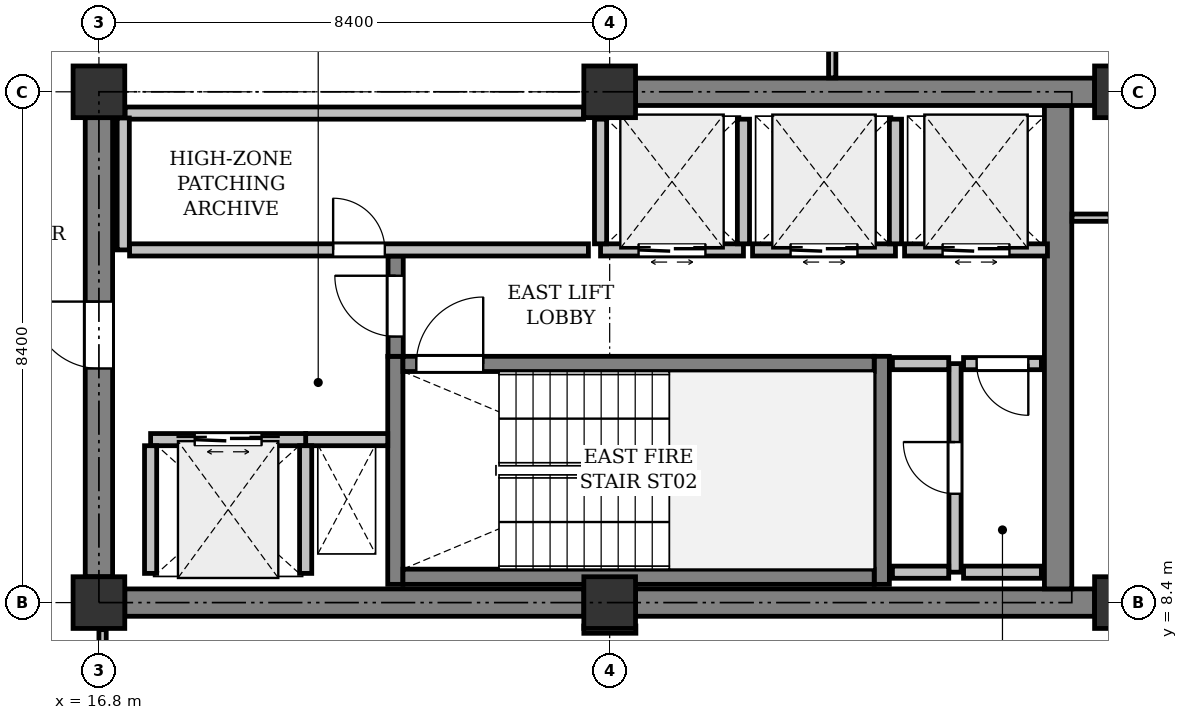
"""IFC4 building model, lengths in metres.
Left out: names, types, materials, properties, quantities, classifications, styles, units other than length and angle.
Written with IfcOpenShell. Run it as: python <this file> out.ifc"""

import sys

from ifc_helpers import new_model, si_unit, direction, frame, frame_2d, origin, origin_2d, place, context, subcontext, project, spatial, rectangle, extrude, element, fill, save


model = new_model("IFC4")
c1 = context("Model", 3, precision=1e-05, world=origin(), true_north=direction((0.0, 1.0)))
c2 = subcontext(c1, "Body", "Model", "MODEL_VIEW")
j1 = project(units=[si_unit("LENGTHUNIT", "METRE"), si_unit("PLANEANGLEUNIT", "RADIAN")], contexts=[c1])
p1 = place(None, origin())
s1 = spatial("IfcSite", under=j1, at=p1, CompositionType="ELEMENT")
p2 = place(p1, origin())
s2 = spatial("IfcBuilding", under=s1, at=p2, CompositionType="ELEMENT")
p3 = place(p2, frame((0.0, 0.0, 302.2)))
s3 = spatial("IfcBuildingStorey", under=s2, at=p3, CompositionType="ELEMENT", Elevation=302.2)
for number, where, z_axis, x_axis in (
    (1, (16.8, 8.4, 0.0), (0.0, 0.0, 1.0), (1.0, 0.0, 0.0)),
    (2, (16.8, 16.8, 0.0), (0.0, 0.0, 1.0), (1.0, 0.0, 0.0)),
    (3, (25.2, 8.4, 0.0), (0.0, 0.0, 1.0), (1.0, 0.0, 0.0)),
    (4, (25.2, 16.8, 0.0), (0.0, 0.0, 1.0), (1.0, 0.0, 0.0)),
    (5, (33.6, 8.4, 0.0), (0.0, 0.0, 1.0), (1.0, 0.0, 0.0)),
    (6, (33.6, 16.8, 0.0), (0.0, 0.0, 1.0), (1.0, 0.0, 0.0)),
):
    element("IfcColumn", number, at=place(p3, frame(where, z_axis=z_axis, x_axis=x_axis)), inside=s3, PredefinedType="COLUMN", context=c2, shape_type="SweptSolid", body=[
        extrude(rectangle(XDim=0.85, YDim=0.85, at=origin_2d()), origin(), (0.0, 0.0, 1.0), 4.0),
    ])
p4 = place(p3, frame((17.225, 8.4, 0.0), z_axis=(0.0, 0.0, 1.0), x_axis=(1.0, 0.0, 0.0)))
e7 = element("IfcWall", 7, at=p4, inside=s3, PredefinedType="SHEAR", context=c2, shape_type="SweptSolid", body=[
    extrude(rectangle(XDim=7.55, YDim=0.45, at=frame_2d((3.775, 0.0))), origin(), (0.0, 0.0, 1.0), 3.725),
])
p5 = place(p3, frame((25.625, 8.4, 0.0), z_axis=(0.0, 0.0, 1.0), x_axis=(1.0, 0.0, 0.0)))
e8 = element("IfcWall", 8, at=p5, inside=s3, PredefinedType="SHEAR", context=c2, shape_type="SweptSolid", body=[
    extrude(rectangle(XDim=7.55, YDim=0.45, at=frame_2d((3.775, 0.0))), origin(), (0.0, 0.0, 1.0), 3.725),
])
p6 = place(p3, frame((32.575, 8.625, 0.0), z_axis=(0.0, 0.0, 1.0), x_axis=(0.0, 1.0, 0.0)))
e9 = element("IfcWall", 9, at=p6, inside=s3, PredefinedType="SHEAR", context=c2, shape_type="SweptSolid", body=[
    extrude(rectangle(XDim=7.95, YDim=0.45, at=frame_2d((3.975, 0.0))), origin(), (0.0, 0.0, 1.0), 3.725),
])
p7 = place(p3, frame((16.8, 8.825, 0.0), z_axis=(0.0, 0.0, 1.0), x_axis=(0.0, 1.0, 0.0)))
e10 = element("IfcWall", 10, at=p7, inside=s3, PredefinedType="SHEAR", context=c2, shape_type="SweptSolid", body=[
    extrude(rectangle(XDim=7.55, YDim=0.45, at=frame_2d((3.775, 0.0))), origin(), (0.0, 0.0, 1.0), 3.725),
])
p8 = place(p7, frame((3.425, 0.0, 0.0)))
e11 = element("IfcOpeningElement", 11, at=p8, cuts=e10, PredefinedType="OPENING", context=c2, shape_type="SweptSolid", body=[
    extrude(rectangle(XDim=1.1, YDim=2.15, at=frame_2d((0.55, 1.075))), frame((0.0, 0.235, 0.0), z_axis=(0.0, -1.0, 0.0), x_axis=(1.0, 0.0, 0.0)), (0.0, 0.0, 1.0), 0.47),
])
p9 = place(p3, frame((25.625, 16.8, 0.0), z_axis=(0.0, 0.0, 1.0), x_axis=(1.0, 0.0, 0.0)))
e12 = element("IfcWall", 12, at=p9, inside=s3, PredefinedType="SHEAR", context=c2, shape_type="SweptSolid", body=[
    extrude(rectangle(XDim=7.55, YDim=0.45, at=frame_2d((3.775, 0.0))), origin(), (0.0, 0.0, 1.0), 3.725),
])
for number, where, z_axis, x_axis in (
    (13, (21.675, 8.7, 0.0), (0.0, 0.0, 1.0), (0.0, 1.0, 0.0)),
    (14, (29.675, 8.7, 0.0), (0.0, 0.0, 1.0), (0.0, 1.0, 0.0)),
):
    element("IfcWall", number, at=place(p3, frame(where, z_axis=z_axis, x_axis=x_axis)), inside=s3, PredefinedType="SHEAR", context=c2, shape_type="SweptSolid", body=[
        extrude(rectangle(XDim=3.75, YDim=0.25, at=frame_2d((1.875, 0.0))), origin(), (0.0, 0.0, 1.0), 3.725),
    ])
p10 = place(p3, frame((21.8, 8.825, 0.0), z_axis=(0.0, 0.0, 1.0), x_axis=(1.0, 0.0, 0.0)))
e15 = element("IfcWall", 15, at=p10, inside=s3, PredefinedType="SHEAR", context=c2, shape_type="SweptSolid", body=[
    extrude(rectangle(XDim=7.75, YDim=0.25, at=frame_2d((3.875, 0.0))), origin(), (0.0, 0.0, 1.0), 3.725),
])
p11 = place(p3, frame((21.8, 12.325, 0.0), z_axis=(0.0, 0.0, 1.0), x_axis=(1.0, 0.0, 0.0)))
e16 = element("IfcWall", 16, at=p11, inside=s3, PredefinedType="SHEAR", context=c2, shape_type="SweptSolid", body=[
    extrude(rectangle(XDim=7.75, YDim=0.25, at=frame_2d((3.875, 0.0))), origin(), (0.0, 0.0, 1.0), 3.725),
])
p12 = place(p11, frame((0.22, 0.0, 0.0)))
e17 = element("IfcOpeningElement", 17, at=p12, cuts=e16, PredefinedType="OPENING", context=c2, shape_type="SweptSolid", body=[
    extrude(rectangle(XDim=1.1, YDim=2.15, at=frame_2d((0.55, 1.075))), frame((0.0, 0.135, 0.0), z_axis=(0.0, -1.0, 0.0), x_axis=(1.0, 0.0, 0.0)), (0.0, 0.0, 1.0), 0.27),
])
p13 = place(p3, frame((20.2, 11.08, 0.0), z_axis=(0.0, 0.0, 1.0), x_axis=(1.0, 0.0, 0.0)))
e18 = element("IfcWall", 18, at=p13, inside=s3, PredefinedType="PARTITIONING", context=c2, shape_type="SweptSolid", body=[
    extrude(rectangle(XDim=1.35, YDim=0.2, at=frame_2d((0.675, 0.0))), origin(), (0.0, 0.0, 1.0), 3.725),
])
p14 = place(p3, frame((21.68, 12.45, 0.0), z_axis=(0.0, 0.0, 1.0), x_axis=(0.0, 1.0, 0.0)))
e19 = element("IfcWall", 19, at=p14, inside=s3, PredefinedType="SHEAR", context=c2, shape_type="SweptSolid", body=[
    extrude(rectangle(XDim=1.65, YDim=0.25, at=frame_2d((0.825, 0.0))), origin(), (0.0, 0.0, 1.0), 3.725),
])
p15 = place(p14, frame((0.325, 0.0, 0.0)))
e20 = element("IfcOpeningElement", 20, at=p15, cuts=e19, PredefinedType="OPENING", context=c2, shape_type="SweptSolid", body=[
    extrude(rectangle(XDim=1.0, YDim=2.15, at=frame_2d((0.5, 1.075))), frame((0.0, 0.135, 0.0), z_axis=(0.0, -1.0, 0.0), x_axis=(1.0, 0.0, 0.0)), (0.0, 0.0, 1.0), 0.27),
])
p16 = place(p3, frame((17.65, 11.08, 0.0), z_axis=(0.0, 0.0, 1.0), x_axis=(1.0, 0.0, 0.0)))
e21 = element("IfcWall", 21, at=p16, inside=s3, PredefinedType="PARTITIONING", context=c2, shape_type="SweptSolid", body=[
    extrude(rectangle(XDim=2.55, YDim=0.2, at=frame_2d((1.275, 0.0))), origin(), (0.0, 0.0, 1.0), 3.725),
])
p17 = place(p16, frame((0.725, 0.0, 0.0)))
e22 = element("IfcOpeningElement", 22, at=p17, cuts=e21, PredefinedType="OPENING", context=c2, shape_type="SweptSolid", body=[
    extrude(rectangle(XDim=1.1, YDim=2.2, at=frame_2d((0.55, 1.1))), frame((0.0, 0.11, 0.0), z_axis=(0.0, -1.0, 0.0), x_axis=(1.0, 0.0, 0.0)), (0.0, 0.0, 1.0), 0.22),
])
for number, where, z_axis, x_axis in (
    (23, (20.2, 8.88, 0.0), (0.0, 0.0, 1.0), (0.0, 1.0, 0.0)),
    (24, (17.65, 8.88, 0.0), (0.0, 0.0, 1.0), (0.0, 1.0, 0.0)),
):
    element("IfcWall", number, at=place(p3, frame(where, z_axis=z_axis, x_axis=x_axis)), inside=s3, PredefinedType="PARTITIONING", context=c2, shape_type="SweptSolid", body=[
        extrude(rectangle(XDim=2.1, YDim=0.2, at=frame_2d((1.05, 0.0))), origin(), (0.0, 0.0, 1.0), 3.725),
    ])
p18 = place(p3, frame((25.05, 14.2, 0.0), z_axis=(0.0, 0.0, 1.0), x_axis=(1.0, 0.0, 0.0)))
e25 = element("IfcWall", 25, at=p18, inside=s3, PredefinedType="PARTITIONING", context=c2, shape_type="SweptSolid", body=[
    extrude(rectangle(XDim=2.35, YDim=0.2, at=frame_2d((1.175, 0.0))), origin(), (0.0, 0.0, 1.0), 3.725),
])
p19 = place(p18, frame((0.625, 0.0, 0.0)))
e26 = element("IfcOpeningElement", 26, at=p19, cuts=e25, PredefinedType="OPENING", context=c2, shape_type="SweptSolid", body=[
    extrude(rectangle(XDim=1.1, YDim=2.2, at=frame_2d((0.55, 1.1))), frame((0.0, 0.11, 0.0), z_axis=(0.0, -1.0, 0.0), x_axis=(1.0, 0.0, 0.0)), (0.0, 0.0, 1.0), 0.22),
])
for number, where, z_axis, x_axis in (
    (27, (27.4, 14.3, 0.0), (0.0, 0.0, 1.0), (0.0, 1.0, 0.0)),
    (28, (25.05, 14.3, 0.0), (0.0, 0.0, 1.0), (0.0, 1.0, 0.0)),
):
    element("IfcWall", number, at=place(p3, frame(where, z_axis=z_axis, x_axis=x_axis)), inside=s3, PredefinedType="PARTITIONING", context=c2, shape_type="SweptSolid", body=[
        extrude(rectangle(XDim=2.05, YDim=0.2, at=frame_2d((1.025, 0.0))), origin(), (0.0, 0.0, 1.0), 3.725),
    ])
p20 = place(p3, frame((27.55, 14.2, 0.0), z_axis=(0.0, 0.0, 1.0), x_axis=(1.0, 0.0, 0.0)))
e29 = element("IfcWall", 29, at=p20, inside=s3, PredefinedType="PARTITIONING", context=c2, shape_type="SweptSolid", body=[
    extrude(rectangle(XDim=2.35, YDim=0.2, at=frame_2d((1.175, 0.0))), origin(), (0.0, 0.0, 1.0), 3.725),
])
p21 = place(p20, frame((0.625, 0.0, 0.0)))
e30 = element("IfcOpeningElement", 30, at=p21, cuts=e29, PredefinedType="OPENING", context=c2, shape_type="SweptSolid", body=[
    extrude(rectangle(XDim=1.1, YDim=2.2, at=frame_2d((0.55, 1.1))), frame((0.0, 0.11, 0.0), z_axis=(0.0, -1.0, 0.0), x_axis=(1.0, 0.0, 0.0)), (0.0, 0.0, 1.0), 0.22),
])
p22 = place(p3, frame((29.9, 14.3, 0.0), z_axis=(0.0, 0.0, 1.0), x_axis=(0.0, 1.0, 0.0)))
e31 = element("IfcWall", 31, at=p22, inside=s3, PredefinedType="PARTITIONING", context=c2, shape_type="SweptSolid", body=[
    extrude(rectangle(XDim=2.05, YDim=0.2, at=frame_2d((1.025, 0.0))), origin(), (0.0, 0.0, 1.0), 3.725),
])
p23 = place(p3, frame((30.05, 14.2, 0.0), z_axis=(0.0, 0.0, 1.0), x_axis=(1.0, 0.0, 0.0)))
e32 = element("IfcWall", 32, at=p23, inside=s3, PredefinedType="PARTITIONING", context=c2, shape_type="SweptSolid", body=[
    extrude(rectangle(XDim=2.35, YDim=0.2, at=frame_2d((1.175, 0.0))), origin(), (0.0, 0.0, 1.0), 3.725),
])
p24 = place(p23, frame((0.625, 0.0, 0.0)))
e33 = element("IfcOpeningElement", 33, at=p24, cuts=e32, PredefinedType="OPENING", context=c2, shape_type="SweptSolid", body=[
    extrude(rectangle(XDim=1.1, YDim=2.2, at=frame_2d((0.55, 1.1))), frame((0.0, 0.11, 0.0), z_axis=(0.0, -1.0, 0.0), x_axis=(1.0, 0.0, 0.0)), (0.0, 0.0, 1.0), 0.22),
])
p25 = place(p3, frame((24.77, 16.45, 0.0), z_axis=(0.0, 0.0, 1.0), x_axis=(-1.0, 0.0, 0.0)))
e34 = element("IfcWall", 34, at=p25, inside=s3, PredefinedType="PARTITIONING", context=c2, shape_type="SweptSolid", body=[
    extrude(rectangle(XDim=7.54, YDim=0.2, at=frame_2d((3.77, 0.0))), origin(), (0.0, 0.0, 1.0), 3.725),
])
p26 = place(p3, frame((17.2, 16.37, 0.0), z_axis=(0.0, 0.0, 1.0), x_axis=(0.0, -1.0, 0.0)))
e35 = element("IfcWall", 35, at=p26, inside=s3, PredefinedType="PARTITIONING", context=c2, shape_type="SweptSolid", body=[
    extrude(rectangle(XDim=2.17, YDim=0.2, at=frame_2d((1.085, 0.0))), origin(), (0.0, 0.0, 1.0), 3.725),
])
p27 = place(p3, frame((17.304, 14.2, 0.0), z_axis=(0.0, 0.0, 1.0), x_axis=(1.0, 0.0, 0.0)))
e36 = element("IfcWall", 36, at=p27, inside=s3, PredefinedType="PARTITIONING", context=c2, shape_type="SweptSolid", body=[
    extrude(rectangle(XDim=7.546, YDim=0.2, at=frame_2d((3.773, 0.0))), origin(), (0.0, 0.0, 1.0), 3.725),
])
p28 = place(p27, frame((3.348, 0.0, 0.0)))
e37 = element("IfcOpeningElement", 37, at=p28, cuts=e36, PredefinedType="OPENING", context=c2, shape_type="SweptSolid", body=[
    extrude(rectangle(XDim=0.85, YDim=2.15, at=frame_2d((0.425, 1.075))), frame((0.0, 0.11, 0.0), z_axis=(0.0, -1.0, 0.0), x_axis=(1.0, 0.0, 0.0)), (0.0, 0.0, 1.0), 0.22),
])
p29 = place(p3, frame((30.88, 8.9, 0.0), z_axis=(0.0, 0.0, 1.0), x_axis=(0.0, 1.0, 0.0)))
e38 = element("IfcWall", 38, at=p29, inside=s3, PredefinedType="PARTITIONING", context=c2, shape_type="SweptSolid", body=[
    extrude(rectangle(XDim=3.43, YDim=0.2, at=frame_2d((1.715, 0.0))), origin(), (0.0, 0.0, 1.0), 3.725),
])
p30 = place(p29, frame((1.29, 0.0, 0.0)))
e39 = element("IfcOpeningElement", 39, at=p30, cuts=e38, PredefinedType="OPENING", context=c2, shape_type="SweptSolid", body=[
    extrude(rectangle(XDim=0.85, YDim=2.15, at=frame_2d((0.425, 1.075))), frame((0.0, 0.11, 0.0), z_axis=(0.0, -1.0, 0.0), x_axis=(1.0, 0.0, 0.0)), (0.0, 0.0, 1.0), 0.22),
])
for number, where, z_axis, x_axis in (
    (40, (30.776, 12.33, 0.0), (0.0, 0.0, 1.0), (-1.0, 0.0, 0.0)),
    (41, (29.85, 8.9, 0.0), (0.0, 0.0, 1.0), (1.0, 0.0, 0.0)),
):
    element("IfcWall", number, at=place(p3, frame(where, z_axis=z_axis, x_axis=x_axis)), inside=s3, PredefinedType="PARTITIONING", context=c2, shape_type="SweptSolid", body=[
        extrude(rectangle(XDim=0.926, YDim=0.2, at=frame_2d((0.463, 0.0))), origin(), (0.0, 0.0, 1.0), 3.725),
    ])
p31 = place(p3, frame((32.3, 12.33, 0.0), z_axis=(0.0, 0.0, 1.0), x_axis=(-1.0, 0.0, 0.0)))
e42 = element("IfcWall", 42, at=p31, inside=s3, PredefinedType="PARTITIONING", context=c2, shape_type="SweptSolid", body=[
    extrude(rectangle(XDim=1.28, YDim=0.2, at=frame_2d((0.64, 0.0))), origin(), (0.0, 0.0, 1.0), 3.725),
])
p32 = place(p31, frame((0.215, 0.0, 0.0)))
e43 = element("IfcOpeningElement", 43, at=p32, cuts=e42, PredefinedType="OPENING", context=c2, shape_type="SweptSolid", body=[
    extrude(rectangle(XDim=0.85, YDim=2.15, at=frame_2d((0.425, 1.075))), frame((0.0, 0.11, 0.0), z_axis=(0.0, -1.0, 0.0), x_axis=(1.0, 0.0, 0.0)), (0.0, 0.0, 1.0), 0.22),
])
p33 = place(p3, frame((31.02, 8.9, 0.0), z_axis=(0.0, 0.0, 1.0), x_axis=(1.0, 0.0, 0.0)))
e44 = element("IfcWall", 44, at=p33, inside=s3, PredefinedType="PARTITIONING", context=c2, shape_type="SweptSolid", body=[
    extrude(rectangle(XDim=1.28, YDim=0.2, at=frame_2d((0.64, 0.0))), origin(), (0.0, 0.0, 1.0), 3.725),
])
p34 = place(p3, frame((28.86, 19.05, 0.0), z_axis=(0.0, 0.0, 1.0), x_axis=(0.0, -1.0, 0.0)))
e45 = element("IfcWall", 45, at=p34, inside=s3, PredefinedType="PARTITIONING", context=c2, shape_type="SweptSolid", body=[
    extrude(rectangle(XDim=2.021, YDim=0.12, at=frame_2d((1.01, 0.0))), origin(), (0.0, 0.0, 1.0), 3.725),
])
p35 = place(p3, frame((32.804, 14.73, 0.0), z_axis=(0.0, 0.0, 1.0), x_axis=(1.0, 0.0, 0.0)))
e46 = element("IfcWall", 46, at=p35, inside=s3, PredefinedType="PARTITIONING", context=c2, shape_type="SweptSolid", body=[
    extrude(rectangle(XDim=0.627, YDim=0.12, at=frame_2d((0.313, 0.0))), origin(), (0.0, 0.0, 1.0), 3.725),
])
p36 = place(p3, frame((25.631, 7.956, 0.0), z_axis=(0.0, 0.0, 1.0), x_axis=(-0.99999963391, -0.000855675671, 0.0)))
e47 = element("IfcWall", 47, at=p36, inside=s3, PredefinedType="PARTITIONING", context=c2, shape_type="SweptSolid", body=[
    extrude(rectangle(XDim=0.856, YDim=0.12, at=frame_2d((0.428, 0.0))), origin(), (0.0, 0.0, 1.0), 3.319),
])
p37 = place(p3, frame((16.86, 7.955, 0.0), z_axis=(0.0, 0.0, 1.0), x_axis=(0.0, -1.0, 0.0)))
e48 = element("IfcWall", 48, at=p37, inside=s3, PredefinedType="PARTITIONING", context=c2, shape_type="SweptSolid", body=[
    extrude(rectangle(XDim=2.555, YDim=0.12, at=frame_2d((1.278, 0.0))), origin(), (0.0, 0.0, 1.0), 3.319),
])
p38 = place(p37, frame((0.802, 0.0, 0.0)))
e49 = element("IfcOpeningElement", 49, at=p38, cuts=e48, PredefinedType="OPENING", context=c2, shape_type="SweptSolid", body=[
    extrude(rectangle(XDim=0.95, YDim=2.15, at=frame_2d((0.475, 1.075))), frame((0.0, 0.07, 0.0), z_axis=(0.0, -1.0, 0.0), x_axis=(1.0, 0.0, 0.0)), (0.0, 0.0, 1.0), 0.14),
])
p39 = place(p8, origin())
e50 = element("IfcDoor", 50, at=p39, inside=s3, OperationType="SINGLE_SWING_RIGHT", PredefinedType="DOOR", context=c2, shape_type="SweptSolid", body=[
    extrude(rectangle(XDim=1.1, YDim=2.15, at=frame_2d((0.55, 1.075))), frame((0.0, 0.025, 0.0), z_axis=(0.0, -1.0, 0.0), x_axis=(1.0, 0.0, 0.0)), (0.0, 0.0, 1.0), 0.05),
])
fill(e11, e50)
p40 = place(p12, origin())
e51 = element("IfcDoor", 51, at=p40, inside=s3, OperationType="SINGLE_SWING_RIGHT", PredefinedType="DOOR", context=c2, shape_type="SweptSolid", body=[
    extrude(rectangle(XDim=1.1, YDim=2.15, at=frame_2d((0.55, 1.075))), frame((0.0, 0.025, 0.0), z_axis=(0.0, -1.0, 0.0), x_axis=(1.0, 0.0, 0.0)), (0.0, 0.0, 1.0), 0.05),
])
fill(e17, e51)
p41 = place(p15, origin())
e52 = element("IfcDoor", 52, at=p41, inside=s3, OperationType="SINGLE_SWING_RIGHT", PredefinedType="DOOR", context=c2, shape_type="SweptSolid", body=[
    extrude(rectangle(XDim=1.0, YDim=2.15, at=frame_2d((0.5, 1.075))), frame((0.0, 0.025, 0.0), z_axis=(0.0, -1.0, 0.0), x_axis=(1.0, 0.0, 0.0)), (0.0, 0.0, 1.0), 0.05),
])
fill(e20, e52)
p42 = place(p17, origin())
e53 = element("IfcDoor", 53, at=p42, inside=s3, OperationType="DOUBLE_DOOR_SLIDING", PredefinedType="DOOR", context=c2, shape_type="SweptSolid", body=[
    extrude(rectangle(XDim=1.1, YDim=2.2, at=frame_2d((0.55, 1.1))), frame((0.0, 0.025, 0.0), z_axis=(0.0, -1.0, 0.0), x_axis=(1.0, 0.0, 0.0)), (0.0, 0.0, 1.0), 0.05),
])
fill(e22, e53)
p43 = place(p19, origin())
e54 = element("IfcDoor", 54, at=p43, inside=s3, OperationType="DOUBLE_DOOR_SLIDING", PredefinedType="DOOR", context=c2, shape_type="SweptSolid", body=[
    extrude(rectangle(XDim=1.1, YDim=2.2, at=frame_2d((0.55, 1.1))), frame((0.0, 0.025, 0.0), z_axis=(0.0, -1.0, 0.0), x_axis=(1.0, 0.0, 0.0)), (0.0, 0.0, 1.0), 0.05),
])
fill(e26, e54)
p44 = place(p21, origin())
e55 = element("IfcDoor", 55, at=p44, inside=s3, OperationType="DOUBLE_DOOR_SLIDING", PredefinedType="DOOR", context=c2, shape_type="SweptSolid", body=[
    extrude(rectangle(XDim=1.1, YDim=2.2, at=frame_2d((0.55, 1.1))), frame((0.0, 0.025, 0.0), z_axis=(0.0, -1.0, 0.0), x_axis=(1.0, 0.0, 0.0)), (0.0, 0.0, 1.0), 0.05),
])
fill(e30, e55)
p45 = place(p24, origin())
e56 = element("IfcDoor", 56, at=p45, inside=s3, OperationType="DOUBLE_DOOR_SLIDING", PredefinedType="DOOR", context=c2, shape_type="SweptSolid", body=[
    extrude(rectangle(XDim=1.1, YDim=2.2, at=frame_2d((0.55, 1.1))), frame((0.0, 0.025, 0.0), z_axis=(0.0, -1.0, 0.0), x_axis=(1.0, 0.0, 0.0)), (0.0, 0.0, 1.0), 0.05),
])
fill(e33, e56)
p46 = place(p28, origin())
e57 = element("IfcDoor", 57, at=p46, inside=s3, OperationType="SINGLE_SWING_LEFT", PredefinedType="DOOR", context=c2, shape_type="SweptSolid", body=[
    extrude(rectangle(XDim=0.85, YDim=2.15, at=frame_2d((0.425, 1.075))), frame((0.0, 0.025, 0.0), z_axis=(0.0, -1.0, 0.0), x_axis=(1.0, 0.0, 0.0)), (0.0, 0.0, 1.0), 0.05),
])
fill(e37, e57)
p47 = place(p30, origin())
e58 = element("IfcDoor", 58, at=p47, inside=s3, OperationType="SINGLE_SWING_RIGHT", PredefinedType="DOOR", context=c2, shape_type="SweptSolid", body=[
    extrude(rectangle(XDim=0.85, YDim=2.15, at=frame_2d((0.425, 1.075))), frame((0.0, 0.025, 0.0), z_axis=(0.0, -1.0, 0.0), x_axis=(1.0, 0.0, 0.0)), (0.0, 0.0, 1.0), 0.05),
])
fill(e39, e58)
p48 = place(p32, origin())
e59 = element("IfcDoor", 59, at=p48, inside=s3, OperationType="SINGLE_SWING_LEFT", PredefinedType="DOOR", context=c2, shape_type="SweptSolid", body=[
    extrude(rectangle(XDim=0.85, YDim=2.15, at=frame_2d((0.425, 1.075))), frame((0.0, 0.025, 0.0), z_axis=(0.0, -1.0, 0.0), x_axis=(1.0, 0.0, 0.0)), (0.0, 0.0, 1.0), 0.05),
])
fill(e43, e59)
save(model, sys.argv[1])
